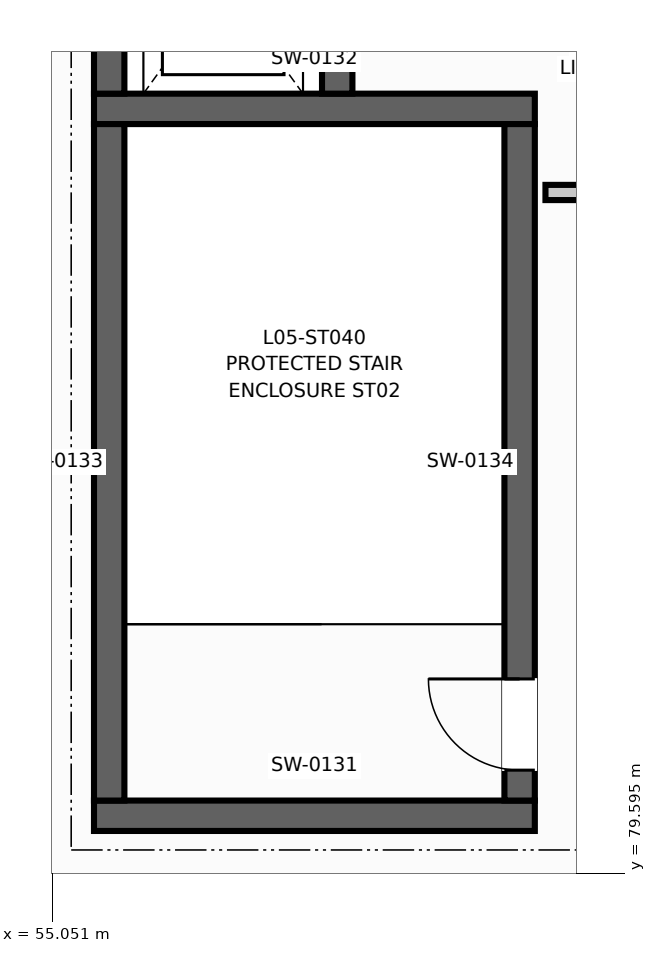
"""IFC4 building model, lengths in metres.
Left out: names, types, materials, properties, quantities, classifications, styles, units other than length and angle.
Written with IfcOpenShell. Run it as: python <this file> out.ifc"""

import sys

from ifc_helpers import new_model, si_unit, direction, frame, frame_2d, origin, place, context, subcontext, project, spatial, rectangle, extrude, element, fill, save


model = new_model("IFC4")
c1 = context("Model", 3, precision=1e-05, world=origin(), true_north=direction((0.0, 1.0)))
c2 = subcontext(c1, "Body", "Model", "MODEL_VIEW")
j1 = project(units=[si_unit("LENGTHUNIT", "METRE"), si_unit("PLANEANGLEUNIT", "RADIAN")], contexts=[c1])
p1 = place(None, origin())
s1 = spatial("IfcSite", under=j1, at=p1, CompositionType="ELEMENT")
p2 = place(p1, origin())
s2 = spatial("IfcBuilding", under=s1, at=p2, CompositionType="ELEMENT")
p3 = place(p2, frame((0.0, 0.0, 22.5)))
s3 = spatial("IfcBuildingStorey", under=s2, at=p3, CompositionType="ELEMENT", Elevation=22.5)
for number, where, z_axis, x_axis in (
    (1, (55.6, 80.35, 0.0), (0.0, 0.0, 1.0), (1.0, 0.0, 0.0)),
    (2, (55.6, 89.65, 0.0), (0.0, 0.0, 1.0), (1.0, 0.0, 0.0)),
):
    element("IfcWall", number, at=place(p3, frame(where, z_axis=z_axis, x_axis=x_axis)), inside=s3, PredefinedType="SHEAR", context=c2, shape_type="SweptSolid", body=[
        extrude(rectangle(XDim=5.8, YDim=0.4, at=frame_2d((2.9, 0.0))), origin(), (0.0, 0.0, 1.0), 4.28),
    ])
p4 = place(p3, frame((55.8, 80.55, 0.0), z_axis=(0.0, 0.0, 1.0), x_axis=(0.0, 1.0, 0.0)))
e3 = element("IfcWall", 3, at=p4, inside=s3, PredefinedType="SHEAR", context=c2, shape_type="SweptSolid", body=[
    extrude(rectangle(XDim=8.9, YDim=0.4, at=frame_2d((4.45, 0.0))), origin(), (0.0, 0.0, 1.0), 4.28),
])
p5 = place(p3, frame((61.2, 80.55, 0.0), z_axis=(0.0, 0.0, 1.0), x_axis=(0.0, 1.0, 0.0)))
e4 = element("IfcWall", 4, at=p5, inside=s3, PredefinedType="SHEAR", context=c2, shape_type="SweptSolid", body=[
    extrude(rectangle(XDim=8.9, YDim=0.4, at=frame_2d((4.45, 0.0))), origin(), (0.0, 0.0, 1.0), 4.28),
])
p6 = place(p5, frame((0.4, 0.0, 0.0)))
e5 = element("IfcOpeningElement", 5, at=p6, cuts=e4, PredefinedType="OPENING", context=c2, shape_type="SweptSolid", body=[
    extrude(rectangle(XDim=1.2, YDim=2.2, at=frame_2d((0.6, 1.1))), frame((0.0, 0.21, 0.0), z_axis=(0.0, -1.0, 0.0), x_axis=(1.0, 0.0, 0.0)), (0.0, 0.0, 1.0), 0.42),
])
p7 = place(p3, frame((55.8, 89.85, 0.0), z_axis=(0.0, 0.0, 1.0), x_axis=(0.0, 1.0, 0.0)))
e6 = element("IfcWall", 6, at=p7, inside=s3, PredefinedType="SHEAR", context=c2, shape_type="SweptSolid", body=[
    extrude(rectangle(XDim=2.9, YDim=0.4, at=frame_2d((1.45, 0.0))), origin(), (0.0, 0.0, 1.0), 4.28),
])
p8 = place(p3, frame((58.8, 89.85, 0.0), z_axis=(0.0, 0.0, 1.0), x_axis=(0.0, 1.0, 0.0)))
e7 = element("IfcWall", 7, at=p8, inside=s3, PredefinedType="SHEAR", context=c2, shape_type="SweptSolid", body=[
    extrude(rectangle(XDim=2.9, YDim=0.4, at=frame_2d((1.45, 0.0))), origin(), (0.0, 0.0, 1.0), 4.28),
])
p9 = place(p8, frame((0.9, 0.0, 0.0)))
e8 = element("IfcOpeningElement", 8, at=p9, cuts=e7, PredefinedType="OPENING", context=c2, shape_type="SweptSolid", body=[
    extrude(rectangle(XDim=1.1, YDim=2.2, at=frame_2d((0.55, 1.1))), frame((0.0, 0.21, 0.0), z_axis=(0.0, -1.0, 0.0), x_axis=(1.0, 0.0, 0.0)), (0.0, 0.0, 1.0), 0.42),
])
p10 = place(p3, frame((61.54, 88.55, 0.0), z_axis=(0.0, 0.0, 1.0), x_axis=(1.0, 0.0, 0.0)))
e9 = element("IfcWall", 9, at=p10, inside=s3, PredefinedType="PARTITIONING", context=c2, shape_type="SweptSolid", body=[
    extrude(rectangle(XDim=4.18, YDim=0.2, at=frame_2d((2.09, 0.0))), origin(), (0.0, 0.0, 1.0), 3.22),
])
p11 = place(p6, origin())
e10 = element("IfcDoor", 10, at=p11, inside=s3, OperationType="SINGLE_SWING_RIGHT", PredefinedType="DOOR", context=c2, shape_type="SweptSolid", body=[
    extrude(rectangle(XDim=1.2, YDim=2.2, at=frame_2d((0.6, 1.1))), frame((0.0, 0.025, 0.0), z_axis=(0.0, -1.0, 0.0), x_axis=(1.0, 0.0, 0.0)), (0.0, 0.0, 1.0), 0.05),
])
fill(e5, e10)
save(model, sys.argv[1])
